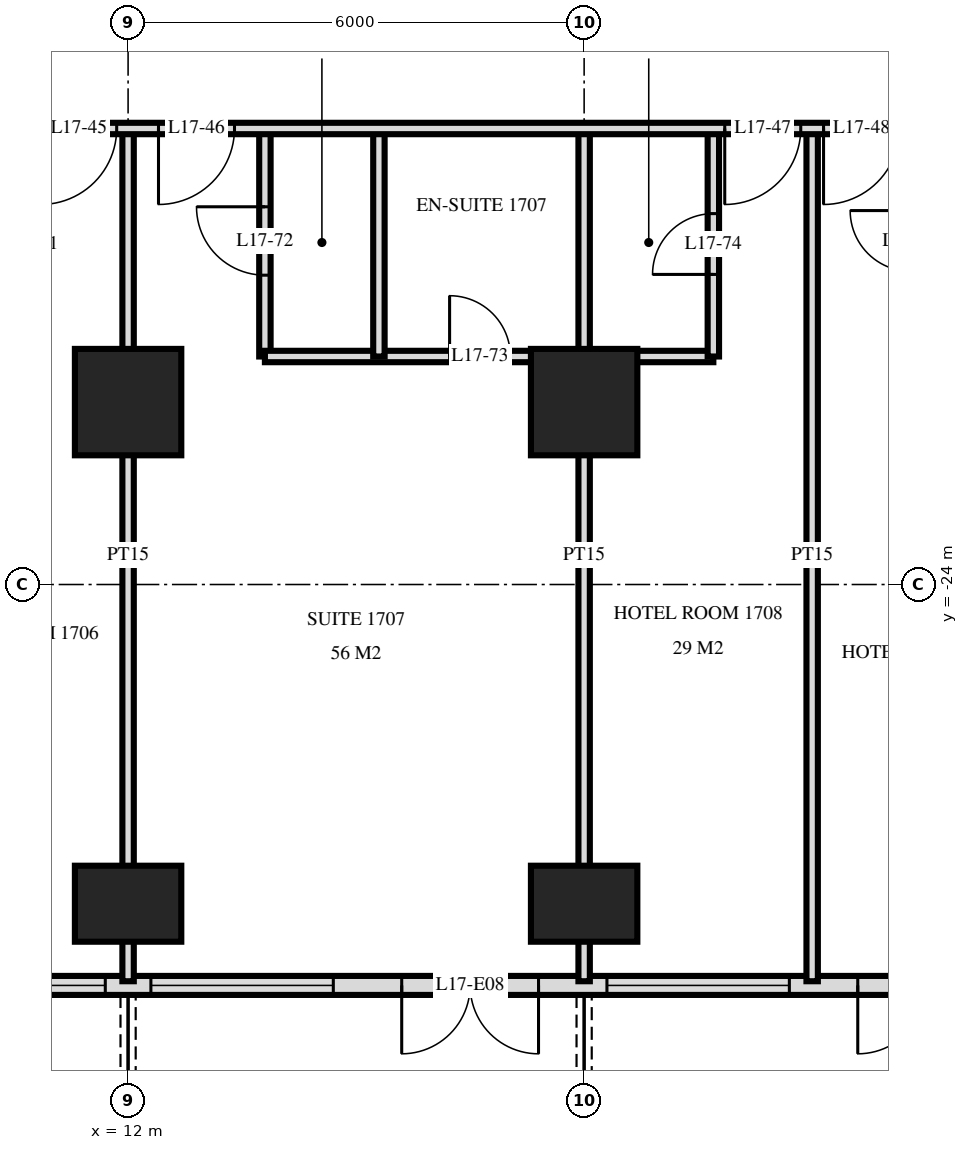
"""IFC4 building model, lengths in metres.
Left out: names, types, materials, properties, quantities, classifications, styles, units other than length and angle.
Written with IfcOpenShell. Run it as: python <this file> out.ifc"""

import sys

from ifc_helpers import new_model, si_unit, direction, frame, frame_2d, origin, origin_2d, place, context, subcontext, project, spatial, rectangle, extrude, element, fill, save


model = new_model("IFC4")
c1 = context("Model", 3, precision=1e-05, world=origin(), true_north=direction((0.0, 1.0)))
c2 = subcontext(c1, "Body", "Model", "MODEL_VIEW")
j1 = project(units=[si_unit("LENGTHUNIT", "METRE"), si_unit("PLANEANGLEUNIT", "RADIAN")], contexts=[c1])
p1 = place(None, origin())
s1 = spatial("IfcSite", under=j1, at=p1, CompositionType="ELEMENT")
p2 = place(p1, origin())
s2 = spatial("IfcBuilding", under=s1, at=p2, CompositionType="ELEMENT")
p3 = place(p2, frame((0.0, 0.0, 70.8)))
s3 = spatial("IfcBuildingStorey", under=s2, at=p3, CompositionType="ELEMENT", Elevation=70.8)
p4 = place(p3, frame((12.0, -28.2, 0.0), z_axis=(0.0, 0.0, 1.0), x_axis=(1.0, 0.0, 0.0)))
e1 = element("IfcColumn", 1, at=p4, inside=s3, PredefinedType="COLUMN", context=c2, shape_type="SweptSolid", body=[
    extrude(rectangle(XDim=1.4, YDim=1.0, at=origin_2d()), origin(), (0.0, 0.0, 1.0), 3.6),
])
p5 = place(p3, frame((12.0, -21.6, 0.0), z_axis=(0.0, 0.0, 1.0), x_axis=(1.0, 0.0, 0.0)))
e2 = element("IfcColumn", 2, at=p5, inside=s3, PredefinedType="COLUMN", context=c2, shape_type="SweptSolid", body=[
    extrude(rectangle(XDim=1.4, YDim=1.4, at=origin_2d()), origin(), (0.0, 0.0, 1.0), 3.6),
])
p6 = place(p3, frame((18.0, -28.2, 0.0), z_axis=(0.0, 0.0, 1.0), x_axis=(1.0, 0.0, 0.0)))
e3 = element("IfcColumn", 3, at=p6, inside=s3, PredefinedType="COLUMN", context=c2, shape_type="SweptSolid", body=[
    extrude(rectangle(XDim=1.4, YDim=1.0, at=origin_2d()), origin(), (0.0, 0.0, 1.0), 3.6),
])
p7 = place(p3, frame((18.0, -21.6, 0.0), z_axis=(0.0, 0.0, 1.0), x_axis=(1.0, 0.0, 0.0)))
e4 = element("IfcColumn", 4, at=p7, inside=s3, PredefinedType="COLUMN", context=c2, shape_type="SweptSolid", body=[
    extrude(rectangle(XDim=1.4, YDim=1.4, at=origin_2d()), origin(), (0.0, 0.0, 1.0), 3.6),
])
p8 = place(p3, frame((-28.775, -29.275, 0.0), z_axis=(0.0, 0.0, 1.0), x_axis=(1.0, 0.0, 0.0)))
e5 = element("IfcWall", 5, at=p8, inside=s3, PredefinedType="SOLIDWALL", context=c2, shape_type="SweptSolid", body=[
    extrude(rectangle(XDim=57.551, YDim=0.25, at=frame_2d((28.775, 0.0))), origin(), (0.0, 0.0, 1.0), 3.32),
])
p9 = place(p8, frame((0.575, 0.0, 0.0)))
e6 = element("IfcOpeningElement", 6, at=p9, cuts=e5, PredefinedType="OPENING", context=c2, shape_type="SweptSolid", body=[
    extrude(rectangle(XDim=1.8, YDim=2.4, at=frame_2d((0.9, 1.2))), frame((0.0, 0.135, 0.0), z_axis=(0.0, -1.0, 0.0), x_axis=(1.0, 0.0, 0.0)), (0.0, 0.0, 1.0), 0.27),
])
p10 = place(p8, frame((5.075, 0.0, 0.3)))
e7 = element("IfcOpeningElement", 7, at=p10, cuts=e5, PredefinedType="OPENING", context=c2, shape_type="SweptSolid", body=[
    extrude(rectangle(XDim=2.4, YDim=2.1, at=frame_2d((1.2, 1.05))), frame((0.0, 0.135, 0.0), z_axis=(0.0, -1.0, 0.0), x_axis=(1.0, 0.0, 0.0)), (0.0, 0.0, 1.0), 0.27),
])
p11 = place(p8, frame((8.375, 0.0, 0.0)))
e8 = element("IfcOpeningElement", 8, at=p11, cuts=e5, PredefinedType="OPENING", context=c2, shape_type="SweptSolid", body=[
    extrude(rectangle(XDim=1.8, YDim=2.4, at=frame_2d((0.9, 1.2))), frame((0.0, 0.135, 0.0), z_axis=(0.0, -1.0, 0.0), x_axis=(1.0, 0.0, 0.0)), (0.0, 0.0, 1.0), 0.27),
])
p12 = place(p8, frame((11.375, 0.0, 0.0)))
e9 = element("IfcOpeningElement", 9, at=p12, cuts=e5, PredefinedType="OPENING", context=c2, shape_type="SweptSolid", body=[
    extrude(rectangle(XDim=1.8, YDim=2.4, at=frame_2d((0.9, 1.2))), frame((0.0, 0.135, 0.0), z_axis=(0.0, -1.0, 0.0), x_axis=(1.0, 0.0, 0.0)), (0.0, 0.0, 1.0), 0.27),
])
p13 = place(p8, frame((14.075, 0.0, 0.3)))
e10 = element("IfcOpeningElement", 10, at=p13, cuts=e5, PredefinedType="OPENING", context=c2, shape_type="SweptSolid", body=[
    extrude(rectangle(XDim=2.4, YDim=2.1, at=frame_2d((1.2, 1.05))), frame((0.0, 0.135, 0.0), z_axis=(0.0, -1.0, 0.0), x_axis=(1.0, 0.0, 0.0)), (0.0, 0.0, 1.0), 0.27),
])
p14 = place(p8, frame((17.375, 0.0, 0.0)))
e11 = element("IfcOpeningElement", 11, at=p14, cuts=e5, PredefinedType="OPENING", context=c2, shape_type="SweptSolid", body=[
    extrude(rectangle(XDim=1.8, YDim=2.4, at=frame_2d((0.9, 1.2))), frame((0.0, 0.135, 0.0), z_axis=(0.0, -1.0, 0.0), x_axis=(1.0, 0.0, 0.0)), (0.0, 0.0, 1.0), 0.27),
])
p15 = place(p8, frame((20.075, 0.0, 0.3)))
e12 = element("IfcOpeningElement", 12, at=p15, cuts=e5, PredefinedType="OPENING", context=c2, shape_type="SweptSolid", body=[
    extrude(rectangle(XDim=2.4, YDim=2.1, at=frame_2d((1.2, 1.05))), frame((0.0, 0.135, 0.0), z_axis=(0.0, -1.0, 0.0), x_axis=(1.0, 0.0, 0.0)), (0.0, 0.0, 1.0), 0.27),
])
p16 = place(p8, frame((23.075, 0.0, 0.3)))
e13 = element("IfcOpeningElement", 13, at=p16, cuts=e5, PredefinedType="OPENING", context=c2, shape_type="SweptSolid", body=[
    extrude(rectangle(XDim=2.4, YDim=2.1, at=frame_2d((1.2, 1.05))), frame((0.0, 0.135, 0.0), z_axis=(0.0, -1.0, 0.0), x_axis=(1.0, 0.0, 0.0)), (0.0, 0.0, 1.0), 0.27),
])
p17 = place(p8, frame((26.375, 0.0, 0.0)))
e14 = element("IfcOpeningElement", 14, at=p17, cuts=e5, PredefinedType="OPENING", context=c2, shape_type="SweptSolid", body=[
    extrude(rectangle(XDim=1.8, YDim=2.4, at=frame_2d((0.9, 1.2))), frame((0.0, 0.135, 0.0), z_axis=(0.0, -1.0, 0.0), x_axis=(1.0, 0.0, 0.0)), (0.0, 0.0, 1.0), 0.27),
])
p18 = place(p8, frame((29.375, 0.0, 0.0)))
e15 = element("IfcOpeningElement", 15, at=p18, cuts=e5, PredefinedType="OPENING", context=c2, shape_type="SweptSolid", body=[
    extrude(rectangle(XDim=1.8, YDim=2.4, at=frame_2d((0.9, 1.2))), frame((0.0, 0.135, 0.0), z_axis=(0.0, -1.0, 0.0), x_axis=(1.0, 0.0, 0.0)), (0.0, 0.0, 1.0), 0.27),
])
p19 = place(p8, frame((32.075, 0.0, 0.3)))
e16 = element("IfcOpeningElement", 16, at=p19, cuts=e5, PredefinedType="OPENING", context=c2, shape_type="SweptSolid", body=[
    extrude(rectangle(XDim=2.4, YDim=2.1, at=frame_2d((1.2, 1.05))), frame((0.0, 0.135, 0.0), z_axis=(0.0, -1.0, 0.0), x_axis=(1.0, 0.0, 0.0)), (0.0, 0.0, 1.0), 0.27),
])
p20 = place(p8, frame((35.375, 0.0, 0.0)))
e17 = element("IfcOpeningElement", 17, at=p20, cuts=e5, PredefinedType="OPENING", context=c2, shape_type="SweptSolid", body=[
    extrude(rectangle(XDim=1.8, YDim=2.4, at=frame_2d((0.9, 1.2))), frame((0.0, 0.135, 0.0), z_axis=(0.0, -1.0, 0.0), x_axis=(1.0, 0.0, 0.0)), (0.0, 0.0, 1.0), 0.27),
])
p21 = place(p8, frame((38.075, 0.0, 0.3)))
e18 = element("IfcOpeningElement", 18, at=p21, cuts=e5, PredefinedType="OPENING", context=c2, shape_type="SweptSolid", body=[
    extrude(rectangle(XDim=2.4, YDim=2.1, at=frame_2d((1.2, 1.05))), frame((0.0, 0.135, 0.0), z_axis=(0.0, -1.0, 0.0), x_axis=(1.0, 0.0, 0.0)), (0.0, 0.0, 1.0), 0.27),
])
p22 = place(p8, frame((41.075, 0.0, 0.3)))
e19 = element("IfcOpeningElement", 19, at=p22, cuts=e5, PredefinedType="OPENING", context=c2, shape_type="SweptSolid", body=[
    extrude(rectangle(XDim=2.4, YDim=2.1, at=frame_2d((1.2, 1.05))), frame((0.0, 0.135, 0.0), z_axis=(0.0, -1.0, 0.0), x_axis=(1.0, 0.0, 0.0)), (0.0, 0.0, 1.0), 0.27),
])
p23 = place(p8, frame((44.375, 0.0, 0.0)))
e20 = element("IfcOpeningElement", 20, at=p23, cuts=e5, PredefinedType="OPENING", context=c2, shape_type="SweptSolid", body=[
    extrude(rectangle(XDim=1.8, YDim=2.4, at=frame_2d((0.9, 1.2))), frame((0.0, 0.135, 0.0), z_axis=(0.0, -1.0, 0.0), x_axis=(1.0, 0.0, 0.0)), (0.0, 0.0, 1.0), 0.27),
])
p24 = place(p8, frame((47.075, 0.0, 0.3)))
e21 = element("IfcOpeningElement", 21, at=p24, cuts=e5, PredefinedType="OPENING", context=c2, shape_type="SweptSolid", body=[
    extrude(rectangle(XDim=2.4, YDim=2.1, at=frame_2d((1.2, 1.05))), frame((0.0, 0.135, 0.0), z_axis=(0.0, -1.0, 0.0), x_axis=(1.0, 0.0, 0.0)), (0.0, 0.0, 1.0), 0.27),
])
p25 = place(p8, frame((50.375, 0.0, 0.0)))
e22 = element("IfcOpeningElement", 22, at=p25, cuts=e5, PredefinedType="OPENING", context=c2, shape_type="SweptSolid", body=[
    extrude(rectangle(XDim=1.8, YDim=2.4, at=frame_2d((0.9, 1.2))), frame((0.0, 0.135, 0.0), z_axis=(0.0, -1.0, 0.0), x_axis=(1.0, 0.0, 0.0)), (0.0, 0.0, 1.0), 0.27),
])
p26 = place(p8, frame((53.375, 0.0, 0.0)))
e23 = element("IfcOpeningElement", 23, at=p26, cuts=e5, PredefinedType="OPENING", context=c2, shape_type="SweptSolid", body=[
    extrude(rectangle(XDim=1.8, YDim=2.4, at=frame_2d((0.9, 1.2))), frame((0.0, 0.135, 0.0), z_axis=(0.0, -1.0, 0.0), x_axis=(1.0, 0.0, 0.0)), (0.0, 0.0, 1.0), 0.27),
])
p27 = place(p3, frame((21.0, -29.22, 0.0), z_axis=(0.0, 0.0, 1.0), x_axis=(0.0, 1.0, 0.0)))
e24 = element("IfcWall", 24, at=p27, inside=s3, PredefinedType="PARTITIONING", context=c2, shape_type="SweptSolid", body=[
    extrude(rectangle(XDim=11.22, YDim=0.15, at=frame_2d((5.61, 0.0))), origin(), (0.0, 0.0, 1.0), 3.32),
])
p28 = place(p3, frame((19.7, -21.0, 0.0), z_axis=(0.0, 0.0, 1.0), x_axis=(0.0, 1.0, 0.0)))
e25 = element("IfcWall", 25, at=p28, inside=s3, PredefinedType="PARTITIONING", context=c2, shape_type="SweptSolid", body=[
    extrude(rectangle(XDim=3.0, YDim=0.15, at=frame_2d((1.5, 0.0))), origin(), (0.0, 0.0, 1.0), 3.32),
])
p29 = place(p28, frame((1.08, 0.0, 0.0)))
e26 = element("IfcOpeningElement", 26, at=p29, cuts=e25, PredefinedType="OPENING", context=c2, shape_type="SweptSolid", body=[
    extrude(rectangle(XDim=0.8, YDim=2.1, at=frame_2d((0.4, 1.05))), frame((0.0, 0.085, 0.0), z_axis=(0.0, -1.0, 0.0), x_axis=(1.0, 0.0, 0.0)), (0.0, 0.0, 1.0), 0.17),
])
p30 = place(p3, frame((18.0, -29.22, 0.0), z_axis=(0.0, 0.0, 1.0), x_axis=(0.0, 1.0, 0.0)))
e27 = element("IfcWall", 27, at=p30, inside=s3, PredefinedType="PARTITIONING", context=c2, shape_type="SweptSolid", body=[
    extrude(rectangle(XDim=11.22, YDim=0.15, at=frame_2d((5.61, 0.0))), origin(), (0.0, 0.0, 1.0), 3.32),
])
p31 = place(p3, frame((15.3, -21.0, 0.0), z_axis=(0.0, 0.0, 1.0), x_axis=(0.0, 1.0, 0.0)))
e28 = element("IfcWall", 28, at=p31, inside=s3, PredefinedType="PARTITIONING", context=c2, shape_type="SweptSolid", body=[
    extrude(rectangle(XDim=3.0, YDim=0.15, at=frame_2d((1.5, 0.0))), origin(), (0.0, 0.0, 1.0), 3.32),
])
p32 = place(p3, frame((13.8, -21.0, 0.0), z_axis=(0.0, 0.0, 1.0), x_axis=(0.0, 1.0, 0.0)))
e29 = element("IfcWall", 29, at=p32, inside=s3, PredefinedType="PARTITIONING", context=c2, shape_type="SweptSolid", body=[
    extrude(rectangle(XDim=3.0, YDim=0.15, at=frame_2d((1.5, 0.0))), origin(), (0.0, 0.0, 1.0), 3.32),
])
p33 = place(p32, frame((1.07, 0.0, 0.0)))
e30 = element("IfcOpeningElement", 30, at=p33, cuts=e29, PredefinedType="OPENING", context=c2, shape_type="SweptSolid", body=[
    extrude(rectangle(XDim=0.9, YDim=2.1, at=frame_2d((0.45, 1.05))), frame((0.0, 0.085, 0.0), z_axis=(0.0, -1.0, 0.0), x_axis=(1.0, 0.0, 0.0)), (0.0, 0.0, 1.0), 0.17),
])
p34 = place(p3, frame((12.0, -29.22, 0.0), z_axis=(0.0, 0.0, 1.0), x_axis=(0.0, 1.0, 0.0)))
e31 = element("IfcWall", 31, at=p34, inside=s3, PredefinedType="PARTITIONING", context=c2, shape_type="SweptSolid", body=[
    extrude(rectangle(XDim=11.22, YDim=0.15, at=frame_2d((5.61, 0.0))), origin(), (0.0, 0.0, 1.0), 3.32),
])
p35 = place(p3, frame((13.8, -21.0, 0.0), z_axis=(0.0, 0.0, 1.0), x_axis=(1.0, 0.0, 0.0)))
e32 = element("IfcWall", 32, at=p35, inside=s3, PredefinedType="PARTITIONING", context=c2, shape_type="SweptSolid", body=[
    extrude(rectangle(XDim=5.9, YDim=0.15, at=frame_2d((2.95, 0.0))), origin(), (0.0, 0.0, 1.0), 3.32),
])
p36 = place(p35, frame((2.43, 0.0, 0.0)))
e33 = element("IfcOpeningElement", 33, at=p36, cuts=e32, PredefinedType="OPENING", context=c2, shape_type="SweptSolid", body=[
    extrude(rectangle(XDim=0.8, YDim=2.1, at=frame_2d((0.4, 1.05))), frame((0.0, 0.085, 0.0), z_axis=(0.0, -1.0, 0.0), x_axis=(1.0, 0.0, 0.0)), (0.0, 0.0, 1.0), 0.17),
])
p37 = place(p3, frame((-33.12, -18.0, 0.0), z_axis=(0.0, 0.0, 1.0), x_axis=(1.0, 0.0, 0.0)))
e34 = element("IfcWall", 34, at=p37, inside=s3, PredefinedType="PARTITIONING", context=c2, shape_type="SweptSolid", body=[
    extrude(rectangle(XDim=66.24, YDim=0.15, at=frame_2d((33.12, 0.0))), origin(), (0.0, 0.0, 1.0), 3.32),
])
p38 = place(p37, frame((15.27, 0.0, 0.0)))
e35 = element("IfcOpeningElement", 35, at=p38, cuts=e34, PredefinedType="OPENING", context=c2, shape_type="SweptSolid", body=[
    extrude(rectangle(XDim=1.0, YDim=2.1, at=frame_2d((0.5, 1.05))), frame((0.0, 0.085, 0.0), z_axis=(0.0, -1.0, 0.0), x_axis=(1.0, 0.0, 0.0)), (0.0, 0.0, 1.0), 0.17),
])
p39 = place(p37, frame((21.22, 0.0, 0.0)))
e36 = element("IfcOpeningElement", 36, at=p39, cuts=e34, PredefinedType="OPENING", context=c2, shape_type="SweptSolid", body=[
    extrude(rectangle(XDim=1.0, YDim=2.1, at=frame_2d((0.5, 1.05))), frame((0.0, 0.085, 0.0), z_axis=(0.0, -1.0, 0.0), x_axis=(1.0, 0.0, 0.0)), (0.0, 0.0, 1.0), 0.17),
])
p40 = place(p37, frame((24.27, 0.0, 0.0)))
e37 = element("IfcOpeningElement", 37, at=p40, cuts=e34, PredefinedType="OPENING", context=c2, shape_type="SweptSolid", body=[
    extrude(rectangle(XDim=1.0, YDim=2.1, at=frame_2d((0.5, 1.05))), frame((0.0, 0.085, 0.0), z_axis=(0.0, -1.0, 0.0), x_axis=(1.0, 0.0, 0.0)), (0.0, 0.0, 1.0), 0.17),
])
p41 = place(p37, frame((30.97, 0.0, 0.0)))
e38 = element("IfcOpeningElement", 38, at=p41, cuts=e34, PredefinedType="OPENING", context=c2, shape_type="SweptSolid", body=[
    extrude(rectangle(XDim=1.0, YDim=2.1, at=frame_2d((0.5, 1.05))), frame((0.0, 0.085, 0.0), z_axis=(0.0, -1.0, 0.0), x_axis=(1.0, 0.0, 0.0)), (0.0, 0.0, 1.0), 0.17),
])
p42 = place(p37, frame((40.42, 0.0, 0.0)))
e39 = element("IfcOpeningElement", 39, at=p42, cuts=e34, PredefinedType="OPENING", context=c2, shape_type="SweptSolid", body=[
    extrude(rectangle(XDim=1.0, YDim=2.1, at=frame_2d((0.5, 1.05))), frame((0.0, 0.085, 0.0), z_axis=(0.0, -1.0, 0.0), x_axis=(1.0, 0.0, 0.0)), (0.0, 0.0, 1.0), 0.17),
])
p43 = place(p37, frame((43.97, 0.0, 0.0)))
e40 = element("IfcOpeningElement", 40, at=p43, cuts=e34, PredefinedType="OPENING", context=c2, shape_type="SweptSolid", body=[
    extrude(rectangle(XDim=1.0, YDim=2.1, at=frame_2d((0.5, 1.05))), frame((0.0, 0.085, 0.0), z_axis=(0.0, -1.0, 0.0), x_axis=(1.0, 0.0, 0.0)), (0.0, 0.0, 1.0), 0.17),
])
p44 = place(p37, frame((45.52, 0.0, 0.0)))
e41 = element("IfcOpeningElement", 41, at=p44, cuts=e34, PredefinedType="OPENING", context=c2, shape_type="SweptSolid", body=[
    extrude(rectangle(XDim=1.0, YDim=2.1, at=frame_2d((0.5, 1.05))), frame((0.0, 0.085, 0.0), z_axis=(0.0, -1.0, 0.0), x_axis=(1.0, 0.0, 0.0)), (0.0, 0.0, 1.0), 0.17),
])
p45 = place(p37, frame((52.97, 0.0, 0.0)))
e42 = element("IfcOpeningElement", 42, at=p45, cuts=e34, PredefinedType="OPENING", context=c2, shape_type="SweptSolid", body=[
    extrude(rectangle(XDim=1.0, YDim=2.1, at=frame_2d((0.5, 1.05))), frame((0.0, 0.085, 0.0), z_axis=(0.0, -1.0, 0.0), x_axis=(1.0, 0.0, 0.0)), (0.0, 0.0, 1.0), 0.17),
])
p46 = place(p37, frame((54.27, 0.0, 0.0)))
e43 = element("IfcOpeningElement", 43, at=p46, cuts=e34, PredefinedType="OPENING", context=c2, shape_type="SweptSolid", body=[
    extrude(rectangle(XDim=1.0, YDim=2.1, at=frame_2d((0.5, 1.05))), frame((0.0, 0.085, 0.0), z_axis=(0.0, -1.0, 0.0), x_axis=(1.0, 0.0, 0.0)), (0.0, 0.0, 1.0), 0.17),
])
p47 = place(p37, frame((13.42, 0.0, 0.0)))
e44 = element("IfcOpeningElement", 44, at=p47, cuts=e34, PredefinedType="OPENING", context=c2, shape_type="SweptSolid", body=[
    extrude(rectangle(XDim=1.0, YDim=2.1, at=frame_2d((0.5, 1.05))), frame((0.0, 0.085, 0.0), z_axis=(0.0, -1.0, 0.0), x_axis=(1.0, 0.0, 0.0)), (0.0, 0.0, 1.0), 0.17),
])
p48 = place(p37, frame((60.82, 0.0, 0.0)))
e45 = element("IfcOpeningElement", 45, at=p48, cuts=e34, PredefinedType="OPENING", context=c2, shape_type="SweptSolid", body=[
    extrude(rectangle(XDim=1.0, YDim=2.1, at=frame_2d((0.5, 1.05))), frame((0.0, 0.085, 0.0), z_axis=(0.0, -1.0, 0.0), x_axis=(1.0, 0.0, 0.0)), (0.0, 0.0, 1.0), 0.17),
])
p49 = place(p21, origin())
e46 = element("IfcWindow", 46, at=p49, inside=s3, PartitioningType="SINGLE_PANEL", PredefinedType="WINDOW", context=c2, shape_type="SweptSolid", body=[
    extrude(rectangle(XDim=2.4, YDim=2.1, at=frame_2d((1.2, 1.05))), frame((0.0, 0.03, 0.0), z_axis=(0.0, -1.0, 0.0), x_axis=(1.0, 0.0, 0.0)), (0.0, 0.0, 1.0), 0.06),
])
fill(e18, e46)
p50 = place(p22, origin())
e47 = element("IfcWindow", 47, at=p50, inside=s3, PartitioningType="SINGLE_PANEL", PredefinedType="WINDOW", context=c2, shape_type="SweptSolid", body=[
    extrude(rectangle(XDim=2.4, YDim=2.1, at=frame_2d((1.2, 1.05))), frame((0.0, 0.03, 0.0), z_axis=(0.0, -1.0, 0.0), x_axis=(1.0, 0.0, 0.0)), (0.0, 0.0, 1.0), 0.06),
])
fill(e19, e47)
p51 = place(p23, frame((0.9, 0.0, 0.0), z_axis=(0.0, 0.0, 1.0), x_axis=(-1.0, 0.0, 0.0)))
e48 = element("IfcDoor", 48, at=p51, inside=s3, OperationType="DOUBLE_DOOR_SINGLE_SWING", PredefinedType="DOOR", context=c2, shape_type="SweptSolid", body=[
    extrude(rectangle(XDim=1.8, YDim=2.4, at=frame_2d((0.0, 1.2))), frame((0.0, -0.025, 0.0), z_axis=(0.0, 1.0, 0.0), x_axis=(-1.0, 0.0, 0.0)), (0.0, 0.0, 1.0), 0.05),
])
fill(e20, e48)
p52 = place(p24, origin())
e49 = element("IfcWindow", 49, at=p52, inside=s3, PartitioningType="SINGLE_PANEL", PredefinedType="WINDOW", context=c2, shape_type="SweptSolid", body=[
    extrude(rectangle(XDim=2.4, YDim=2.1, at=frame_2d((1.2, 1.05))), frame((0.0, 0.03, 0.0), z_axis=(0.0, -1.0, 0.0), x_axis=(1.0, 0.0, 0.0)), (0.0, 0.0, 1.0), 0.06),
])
fill(e21, e49)
p53 = place(p25, frame((0.9, 0.0, 0.0), z_axis=(0.0, 0.0, 1.0), x_axis=(-1.0, 0.0, 0.0)))
e50 = element("IfcDoor", 50, at=p53, inside=s3, OperationType="DOUBLE_DOOR_SINGLE_SWING", PredefinedType="DOOR", context=c2, shape_type="SweptSolid", body=[
    extrude(rectangle(XDim=1.8, YDim=2.4, at=frame_2d((0.0, 1.2))), frame((0.0, -0.025, 0.0), z_axis=(0.0, 1.0, 0.0), x_axis=(-1.0, 0.0, 0.0)), (0.0, 0.0, 1.0), 0.05),
])
fill(e22, e50)
p54 = place(p43, frame((0.5, 0.0, 0.0), z_axis=(0.0, 0.0, 1.0), x_axis=(-1.0, 0.0, 0.0)))
e51 = element("IfcDoor", 51, at=p54, inside=s3, OperationType="SINGLE_SWING_LEFT", PredefinedType="DOOR", context=c2, shape_type="SweptSolid", body=[
    extrude(rectangle(XDim=1.0, YDim=2.1, at=frame_2d((0.0, 1.05))), frame((0.0, -0.025, 0.0), z_axis=(0.0, 1.0, 0.0), x_axis=(-1.0, 0.0, 0.0)), (0.0, 0.0, 1.0), 0.05),
])
fill(e40, e51)
p55 = place(p44, frame((0.5, 0.0, 0.0), z_axis=(0.0, 0.0, 1.0), x_axis=(-1.0, 0.0, 0.0)))
e52 = element("IfcDoor", 52, at=p55, inside=s3, OperationType="SINGLE_SWING_LEFT", PredefinedType="DOOR", context=c2, shape_type="SweptSolid", body=[
    extrude(rectangle(XDim=1.0, YDim=2.1, at=frame_2d((0.0, 1.05))), frame((0.0, -0.025, 0.0), z_axis=(0.0, 1.0, 0.0), x_axis=(-1.0, 0.0, 0.0)), (0.0, 0.0, 1.0), 0.05),
])
fill(e41, e52)
p56 = place(p45, frame((0.5, 0.0, 0.0), z_axis=(0.0, 0.0, 1.0), x_axis=(-1.0, 0.0, 0.0)))
e53 = element("IfcDoor", 53, at=p56, inside=s3, OperationType="SINGLE_SWING_LEFT", PredefinedType="DOOR", context=c2, shape_type="SweptSolid", body=[
    extrude(rectangle(XDim=1.0, YDim=2.1, at=frame_2d((0.0, 1.05))), frame((0.0, -0.025, 0.0), z_axis=(0.0, 1.0, 0.0), x_axis=(-1.0, 0.0, 0.0)), (0.0, 0.0, 1.0), 0.05),
])
fill(e42, e53)
p57 = place(p46, frame((0.5, 0.0, 0.0), z_axis=(0.0, 0.0, 1.0), x_axis=(-1.0, 0.0, 0.0)))
e54 = element("IfcDoor", 54, at=p57, inside=s3, OperationType="SINGLE_SWING_LEFT", PredefinedType="DOOR", context=c2, shape_type="SweptSolid", body=[
    extrude(rectangle(XDim=1.0, YDim=2.1, at=frame_2d((0.0, 1.05))), frame((0.0, -0.025, 0.0), z_axis=(0.0, 1.0, 0.0), x_axis=(-1.0, 0.0, 0.0)), (0.0, 0.0, 1.0), 0.05),
])
fill(e43, e54)
p58 = place(p33, origin())
e55 = element("IfcDoor", 55, at=p58, inside=s3, OperationType="SINGLE_SWING_LEFT", PredefinedType="DOOR", context=c2, shape_type="SweptSolid", body=[
    extrude(rectangle(XDim=0.9, YDim=2.1, at=frame_2d((0.45, 1.05))), frame((0.0, 0.025, 0.0), z_axis=(0.0, -1.0, 0.0), x_axis=(1.0, 0.0, 0.0)), (0.0, 0.0, 1.0), 0.05),
])
fill(e30, e55)
p59 = place(p36, origin())
e56 = element("IfcDoor", 56, at=p59, inside=s3, OperationType="SINGLE_SWING_RIGHT", PredefinedType="DOOR", context=c2, shape_type="SweptSolid", body=[
    extrude(rectangle(XDim=0.8, YDim=2.1, at=frame_2d((0.4, 1.05))), frame((0.0, 0.025, 0.0), z_axis=(0.0, -1.0, 0.0), x_axis=(1.0, 0.0, 0.0)), (0.0, 0.0, 1.0), 0.05),
])
fill(e33, e56)
p60 = place(p29, origin())
e57 = element("IfcDoor", 57, at=p60, inside=s3, OperationType="SINGLE_SWING_RIGHT", PredefinedType="DOOR", context=c2, shape_type="SweptSolid", body=[
    extrude(rectangle(XDim=0.8, YDim=2.1, at=frame_2d((0.4, 1.05))), frame((0.0, 0.025, 0.0), z_axis=(0.0, -1.0, 0.0), x_axis=(1.0, 0.0, 0.0)), (0.0, 0.0, 1.0), 0.05),
])
fill(e26, e57)
save(model, sys.argv[1])
